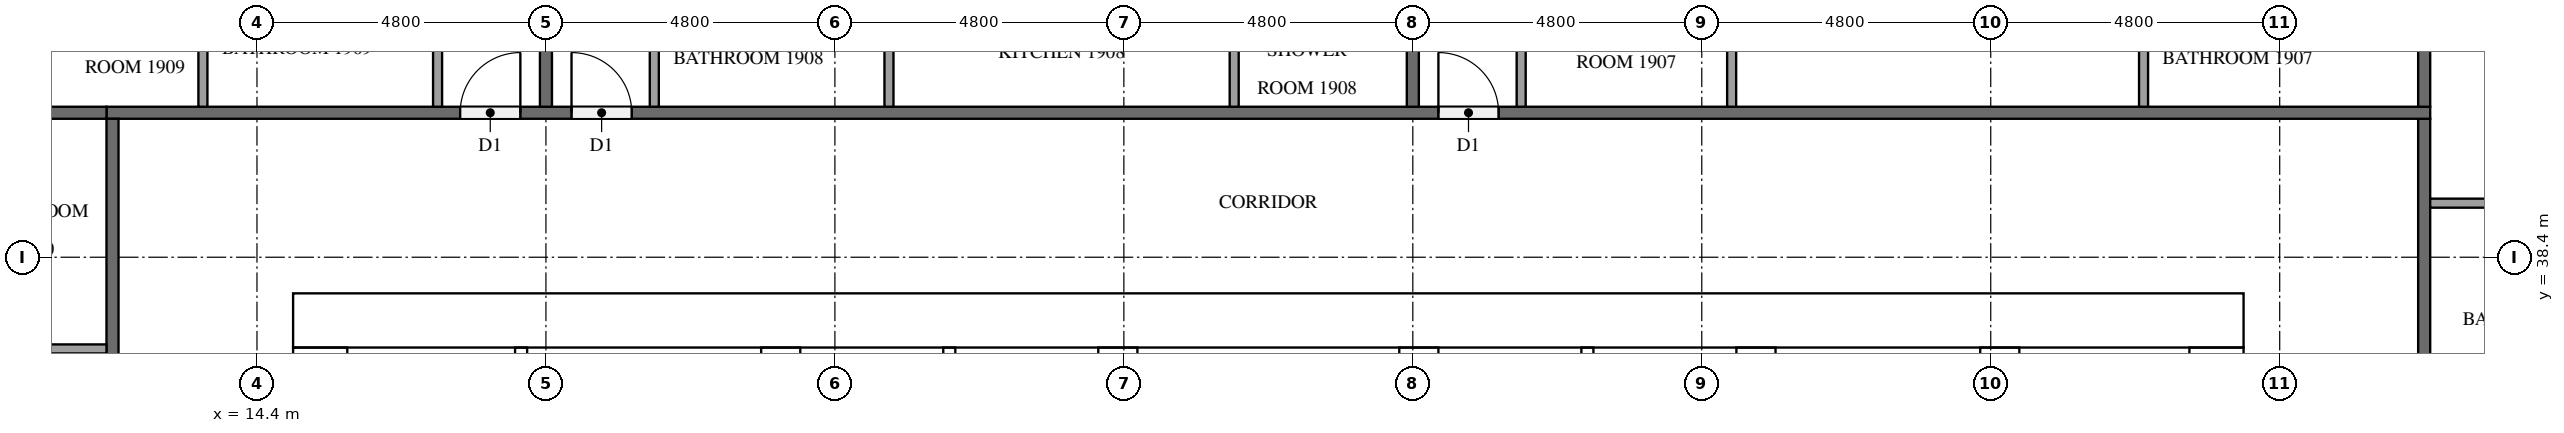
"""IFC4 building model, lengths in metres.
Left out: names, types, materials, properties, quantities, classifications, styles, units other than length and angle.
Written with IfcOpenShell. Run it as: python <this file> out.ifc"""

import sys

from ifc_helpers import new_model, si_unit, direction, frame, frame_2d, origin, place, context, subcontext, project, spatial, rectangle, extrude, element, fill, save


model = new_model("IFC4")
c1 = context("Model", 3, precision=1e-05, world=origin(), true_north=direction((0.0, 1.0)))
c2 = subcontext(c1, "Body", "Model", "MODEL_VIEW")
j1 = project(units=[si_unit("LENGTHUNIT", "METRE"), si_unit("PLANEANGLEUNIT", "RADIAN")], contexts=[c1])
p1 = place(None, origin())
s1 = spatial("IfcSite", under=j1, at=p1, CompositionType="ELEMENT")
p2 = place(p1, origin())
s2 = spatial("IfcBuilding", under=s1, at=p2, CompositionType="ELEMENT")
p3 = place(p2, frame((0.0, 0.0, 76.8)))
s3 = spatial("IfcBuildingStorey", under=s2, at=p3, CompositionType="ELEMENT", Elevation=76.8)
p4 = place(p3, frame((15.0, 37.35, 0.0), z_axis=(0.0, 0.0, 1.0), x_axis=(1.0, 0.0, 0.0)))
e1 = element("IfcWall", 1, at=p4, inside=s3, PredefinedType="SHEAR", context=c2, shape_type="SweptSolid", body=[
    extrude(rectangle(XDim=32.4, YDim=0.9, at=frame_2d((16.2, 0.0))), origin(), (0.0, 0.0, 1.0), 3.2),
])
p5 = place(p4, frame((15.3, 0.0, 0.0)))
e2 = element("IfcOpeningElement", 2, at=p5, cuts=e1, PredefinedType="OPENING", context=c2, shape_type="SweptSolid", body=[
    extrude(rectangle(XDim=1.8, YDim=2.1, at=frame_2d((0.9, 1.05))), frame((0.0, 0.46, 0.0), z_axis=(0.0, -1.0, 0.0), x_axis=(1.0, 0.0, 0.0)), (0.0, 0.0, 1.0), 0.92),
])
p6 = place(p4, frame((1.794, 0.0, 0.0)))
e3 = element("IfcOpeningElement", 3, at=p6, cuts=e1, PredefinedType="OPENING", context=c2, shape_type="SweptSolid", body=[
    extrude(rectangle(XDim=1.0, YDim=2.1, at=frame_2d((0.5, 1.05))), frame((0.0, 0.46, 0.0), z_axis=(0.0, -1.0, 0.0), x_axis=(1.0, 0.0, 0.0)), (0.0, 0.0, 1.0), 0.92),
])
p7 = place(p4, frame((5.331, 0.0, 0.0)))
e4 = element("IfcOpeningElement", 4, at=p7, cuts=e1, PredefinedType="OPENING", context=c2, shape_type="SweptSolid", body=[
    extrude(rectangle(XDim=1.0, YDim=2.1, at=frame_2d((0.5, 1.05))), frame((0.0, 0.46, 0.0), z_axis=(0.0, -1.0, 0.0), x_axis=(1.0, 0.0, 0.0)), (0.0, 0.0, 1.0), 0.92),
])
p8 = place(p3, frame((15.45, 15.9, 0.0), z_axis=(0.0, 0.0, 1.0), x_axis=(0.0, 1.0, 0.0)))
e5 = element("IfcWall", 5, at=p8, inside=s3, PredefinedType="SHEAR", context=c2, shape_type="SweptSolid", body=[
    extrude(rectangle(XDim=21.0, YDim=0.9, at=frame_2d((10.5, 0.0))), origin(), (0.0, 0.0, 1.0), 3.2),
])
p9 = place(p8, frame((4.86, 0.0, 0.0)))
e6 = element("IfcOpeningElement", 6, at=p9, cuts=e5, PredefinedType="OPENING", context=c2, shape_type="SweptSolid", body=[
    extrude(rectangle(XDim=1.2, YDim=2.1, at=frame_2d((0.6, 1.05))), frame((0.0, 0.46, 0.0), z_axis=(0.0, -1.0, 0.0), x_axis=(1.0, 0.0, 0.0)), (0.0, 0.0, 1.0), 0.92),
])
p10 = place(p3, frame((46.95, 15.9, 0.0), z_axis=(0.0, 0.0, 1.0), x_axis=(0.0, 1.0, 0.0)))
e7 = element("IfcWall", 7, at=p10, inside=s3, PredefinedType="SHEAR", context=c2, shape_type="SweptSolid", body=[
    extrude(rectangle(XDim=21.0, YDim=0.9, at=frame_2d((10.5, 0.0))), origin(), (0.0, 0.0, 1.0), 3.2),
])
p11 = place(p10, frame((10.2, 0.0, 0.0)))
e8 = element("IfcOpeningElement", 8, at=p11, cuts=e7, PredefinedType="OPENING", context=c2, shape_type="SweptSolid", body=[
    extrude(rectangle(XDim=1.2, YDim=2.1, at=frame_2d((0.6, 1.05))), frame((0.0, 0.46, 0.0), z_axis=(0.0, -1.0, 0.0), x_axis=(1.0, 0.0, 0.0)), (0.0, 0.0, 1.0), 0.92),
])
p12 = place(p3, frame((23.1, 15.9, 0.0), z_axis=(0.0, 0.0, 1.0), x_axis=(0.0, 1.0, 0.0)))
e9 = element("IfcWall", 9, at=p12, inside=s3, PredefinedType="SHEAR", context=c2, shape_type="SweptSolid", body=[
    extrude(rectangle(XDim=21.0, YDim=0.65, at=frame_2d((10.5, 0.0))), origin(), (0.0, 0.0, 1.0), 3.2),
])
p13 = place(p3, frame((39.3, 27.75, 0.0), z_axis=(0.0, 0.0, 1.0), x_axis=(0.0, 1.0, 0.0)))
e10 = element("IfcWall", 10, at=p13, inside=s3, PredefinedType="SHEAR", context=c2, shape_type="SweptSolid", body=[
    extrude(rectangle(XDim=9.15, YDim=0.65, at=frame_2d((4.575, 0.0))), origin(), (0.0, 0.0, 1.0), 3.2),
])
p14 = place(p3, frame((43.35, 27.75, 0.0), z_axis=(0.0, 0.0, 1.0), x_axis=(0.0, 1.0, 0.0)))
e11 = element("IfcWall", 11, at=p14, inside=s3, PredefinedType="SHEAR", context=c2, shape_type="SweptSolid", body=[
    extrude(rectangle(XDim=9.15, YDim=0.65, at=frame_2d((4.575, 0.0))), origin(), (0.0, 0.0, 1.0), 3.2),
])
p15 = place(p14, frame((7.65, 0.0, 0.0)))
e12 = element("IfcOpeningElement", 12, at=p15, cuts=e11, PredefinedType="OPENING", context=c2, shape_type="SweptSolid", body=[
    extrude(rectangle(XDim=1.2, YDim=2.1, at=frame_2d((0.6, 1.05))), frame((0.0, 0.335, 0.0), z_axis=(0.0, -1.0, 0.0), x_axis=(1.0, 0.0, 0.0)), (0.0, 0.0, 1.0), 0.67),
])
for number, where, z_axis, x_axis in (
    (13, (28.7, 33.875, 0.0), (0.0, 0.0, 1.0), (0.0, 1.0, 0.0)),
    (14, (33.7, 33.875, 0.0), (0.0, 0.0, 1.0), (0.0, 1.0, 0.0)),
):
    element("IfcWall", number, at=place(p3, frame(where, z_axis=z_axis, x_axis=x_axis)), inside=s3, PredefinedType="SHEAR", context=c2, shape_type="SweptSolid", body=[
        extrude(rectangle(XDim=3.025, YDim=0.65, at=frame_2d((1.512, 0.0))), origin(), (0.0, 0.0, 1.0), 3.2),
    ])
for number, where, z_axis, x_axis in (
    (15, (25.9, 33.875, 0.0), (0.0, 0.0, 1.0), (0.0, 1.0, 0.0)),
    (16, (36.5, 33.875, 0.0), (0.0, 0.0, 1.0), (0.0, 1.0, 0.0)),
):
    element("IfcWall", number, at=place(p3, frame(where, z_axis=z_axis, x_axis=x_axis)), inside=s3, PredefinedType="SOLIDWALL", context=c2, shape_type="SweptSolid", body=[
        extrude(rectangle(XDim=3.025, YDim=0.2, at=frame_2d((1.512, 0.0))), origin(), (0.0, 0.0, 1.0), 3.2),
    ])
p16 = place(p3, frame((18.788, 31.575, 0.0), z_axis=(0.0, 0.0, 1.0), x_axis=(0.0, 1.0, 0.0)))
e17 = element("IfcWall", 17, at=p16, inside=s3, PredefinedType="PARTITIONING", context=c2, shape_type="SweptSolid", body=[
    extrude(rectangle(XDim=5.325, YDim=0.2, at=frame_2d((2.663, 0.0))), origin(), (0.0, 0.0, 1.0), 3.2),
])
p17 = place(p3, frame((50.4, 40.7, 0.0), z_axis=(0.0, 0.0, 1.0), x_axis=(0.0, -1.0, 0.0)))
e18 = element("IfcWall", 18, at=p17, inside=s3, PredefinedType="PARTITIONING", context=c2, shape_type="SweptSolid", body=[
    extrude(rectangle(XDim=28.6, YDim=0.2, at=frame_2d((14.3, 0.0))), origin(), (0.0, 0.0, 1.0), 3.2),
])
p18 = place(p17, frame((21.875, 0.0, 0.0)))
e19 = element("IfcOpeningElement", 19, at=p18, cuts=e18, PredefinedType="OPENING", context=c2, shape_type="SweptSolid", body=[
    extrude(rectangle(XDim=1.1, YDim=2.1, at=frame_2d((0.55, 1.05))), frame((0.0, 0.11, 0.0), z_axis=(0.0, -1.0, 0.0), x_axis=(1.0, 0.0, 0.0)), (0.0, 0.0, 1.0), 0.22),
])
p19 = place(p17, frame((20.075, 0.0, 0.0)))
e20 = element("IfcOpeningElement", 20, at=p19, cuts=e18, PredefinedType="OPENING", context=c2, shape_type="SweptSolid", body=[
    extrude(rectangle(XDim=1.0, YDim=2.1, at=frame_2d((0.5, 1.05))), frame((0.0, 0.11, 0.0), z_axis=(0.0, -1.0, 0.0), x_axis=(1.0, 0.0, 0.0)), (0.0, 0.0, 1.0), 0.22),
])
p20 = place(p17, frame((5.675, 0.0, 0.0)))
e21 = element("IfcOpeningElement", 21, at=p20, cuts=e18, PredefinedType="OPENING", context=c2, shape_type="SweptSolid", body=[
    extrude(rectangle(XDim=1.0, YDim=2.1, at=frame_2d((0.5, 1.05))), frame((0.0, 0.11, 0.0), z_axis=(0.0, -1.0, 0.0), x_axis=(1.0, 0.0, 0.0)), (0.0, 0.0, 1.0), 0.22),
])
p21 = place(p3, frame((11.9, 40.8, 0.0), z_axis=(0.0, 0.0, 1.0), x_axis=(1.0, 0.0, 0.0)))
e22 = element("IfcWall", 22, at=p21, inside=s3, PredefinedType="PARTITIONING", context=c2, shape_type="SweptSolid", body=[
    extrude(rectangle(XDim=38.6, YDim=0.2, at=frame_2d((19.3, 0.0))), origin(), (0.0, 0.0, 1.0), 3.2),
])
p22 = place(p21, frame((22.125, 0.0, 0.0)))
e23 = element("IfcOpeningElement", 23, at=p22, cuts=e22, PredefinedType="OPENING", context=c2, shape_type="SweptSolid", body=[
    extrude(rectangle(XDim=1.0, YDim=2.1, at=frame_2d((0.5, 1.05))), frame((0.0, 0.11, 0.0), z_axis=(0.0, -1.0, 0.0), x_axis=(1.0, 0.0, 0.0)), (0.0, 0.0, 1.0), 0.22),
])
p23 = place(p21, frame((7.725, 0.0, 0.0)))
e24 = element("IfcOpeningElement", 24, at=p23, cuts=e22, PredefinedType="OPENING", context=c2, shape_type="SweptSolid", body=[
    extrude(rectangle(XDim=1.0, YDim=2.1, at=frame_2d((0.5, 1.05))), frame((0.0, 0.11, 0.0), z_axis=(0.0, -1.0, 0.0), x_axis=(1.0, 0.0, 0.0)), (0.0, 0.0, 1.0), 0.22),
])
p24 = place(p21, frame((5.875, 0.0, 0.0)))
e25 = element("IfcOpeningElement", 25, at=p24, cuts=e22, PredefinedType="OPENING", context=c2, shape_type="SweptSolid", body=[
    extrude(rectangle(XDim=1.0, YDim=2.1, at=frame_2d((0.5, 1.05))), frame((0.0, 0.11, 0.0), z_axis=(0.0, -1.0, 0.0), x_axis=(1.0, 0.0, 0.0)), (0.0, 0.0, 1.0), 0.22),
])
p25 = place(p3, frame((12.0, 12.1, 0.0), z_axis=(0.0, 0.0, 1.0), x_axis=(0.0, 1.0, 0.0)))
e26 = element("IfcWall", 26, at=p25, inside=s3, PredefinedType="PARTITIONING", context=c2, shape_type="SweptSolid", body=[
    extrude(rectangle(XDim=28.6, YDim=0.2, at=frame_2d((14.3, 0.0))), origin(), (0.0, 0.0, 1.0), 3.2),
])
p26 = place(p25, frame((14.725, 0.0, 0.0)))
e27 = element("IfcOpeningElement", 27, at=p26, cuts=e26, PredefinedType="OPENING", context=c2, shape_type="SweptSolid", body=[
    extrude(rectangle(XDim=1.0, YDim=2.1, at=frame_2d((0.5, 1.05))), frame((0.0, 0.11, 0.0), z_axis=(0.0, -1.0, 0.0), x_axis=(1.0, 0.0, 0.0)), (0.0, 0.0, 1.0), 0.22),
])
p27 = place(p25, frame((12.875, 0.0, 0.0)))
e28 = element("IfcOpeningElement", 28, at=p27, cuts=e26, PredefinedType="OPENING", context=c2, shape_type="SweptSolid", body=[
    extrude(rectangle(XDim=1.0, YDim=2.1, at=frame_2d((0.5, 1.05))), frame((0.0, 0.11, 0.0), z_axis=(0.0, -1.0, 0.0), x_axis=(1.0, 0.0, 0.0)), (0.0, 0.0, 1.0), 0.22),
])
p28 = place(p25, frame((0.875, 0.0, 0.0)))
e29 = element("IfcOpeningElement", 29, at=p28, cuts=e26, PredefinedType="OPENING", context=c2, shape_type="SweptSolid", body=[
    extrude(rectangle(XDim=1.0, YDim=2.1, at=frame_2d((0.5, 1.05))), frame((0.0, 0.11, 0.0), z_axis=(0.0, -1.0, 0.0), x_axis=(1.0, 0.0, 0.0)), (0.0, 0.0, 1.0), 0.22),
])
for number, where, z_axis, x_axis in (
    (30, (50.4, 40.9, 0.0), (0.0, 0.0, 1.0), (0.0, 1.0, 0.0)),
    (31, (33.6, 47.9, 0.0), (0.0, 0.0, 1.0), (0.0, -1.0, 0.0)),
):
    element("IfcWall", number, at=place(p3, frame(where, z_axis=z_axis, x_axis=x_axis)), inside=s3, PredefinedType="PARTITIONING", context=c2, shape_type="SweptSolid", body=[
        extrude(rectangle(XDim=7.0, YDim=0.2, at=frame_2d((3.5, 0.0))), origin(), (0.0, 0.0, 1.0), 3.2),
    ])
p29 = place(p3, frame((19.2, 47.575, 0.0), z_axis=(0.0, 0.0, 1.0), x_axis=(0.0, -1.0, 0.0)))
e32 = element("IfcWall", 32, at=p29, inside=s3, PredefinedType="PARTITIONING", context=c2, shape_type="SweptSolid", body=[
    extrude(rectangle(XDim=6.675, YDim=0.2, at=frame_2d((3.337, 0.0))), origin(), (0.0, 0.0, 1.0), 3.2),
])
p30 = place(p3, frame((4.9, 40.8, 0.0), z_axis=(0.0, 0.0, 1.0), x_axis=(1.0, 0.0, 0.0)))
e33 = element("IfcWall", 33, at=p30, inside=s3, PredefinedType="PARTITIONING", context=c2, shape_type="SweptSolid", body=[
    extrude(rectangle(XDim=7.0, YDim=0.2, at=frame_2d((3.5, 0.0))), origin(), (0.0, 0.0, 1.0), 3.2),
])
p31 = place(p3, frame((50.5, 39.298, 0.0), z_axis=(0.0, 0.0, 1.0), x_axis=(1.0, 0.0, 0.0)))
e34 = element("IfcWall", 34, at=p31, inside=s3, PredefinedType="PARTITIONING", context=c2, shape_type="SweptSolid", body=[
    extrude(rectangle(XDim=3.575, YDim=0.15, at=frame_2d((1.788, 0.0))), origin(), (0.0, 0.0, 1.0), 3.2),
])
for number, where, z_axis, x_axis in (
    (35, (38.896, 40.9, 0.0), (0.0, 0.0, 1.0), (0.0, 1.0, 0.0)),
    (36, (45.739, 40.9, 0.0), (0.0, 0.0, 1.0), (0.0, 1.0, 0.0)),
):
    element("IfcWall", number, at=place(p3, frame(where, z_axis=z_axis, x_axis=x_axis)), inside=s3, PredefinedType="PARTITIONING", context=c2, shape_type="SweptSolid", body=[
        extrude(rectangle(XDim=2.075, YDim=0.15, at=frame_2d((1.038, 0.0))), origin(), (0.0, 0.0, 1.0), 3.2),
    ])
p32 = place(p3, frame((35.4, 40.9, 0.0), z_axis=(0.0, 0.0, 1.0), x_axis=(0.0, 1.0, 0.0)))
e37 = element("IfcWall", 37, at=p32, inside=s3, PredefinedType="PARTITIONING", context=c2, shape_type="SweptSolid", body=[
    extrude(rectangle(XDim=2.225, YDim=0.15, at=frame_2d((1.113, 0.0))), origin(), (0.0, 0.0, 1.0), 3.2),
])
for number, where, z_axis, x_axis in (
    (38, (24.898, 40.9, 0.0), (0.0, 0.0, 1.0), (0.0, 1.0, 0.0)),
    (39, (30.633, 40.9, 0.0), (0.0, 0.0, 1.0), (0.0, 1.0, 0.0)),
):
    element("IfcWall", number, at=place(p3, frame(where, z_axis=z_axis, x_axis=x_axis)), inside=s3, PredefinedType="PARTITIONING", context=c2, shape_type="SweptSolid", body=[
        extrude(rectangle(XDim=1.775, YDim=0.15, at=frame_2d((0.888, 0.0))), origin(), (0.0, 0.0, 1.0), 3.2),
    ])
p33 = place(p3, frame((21.0, 40.9, 0.0), z_axis=(0.0, 0.0, 1.0), x_axis=(0.0, 1.0, 0.0)))
e40 = element("IfcWall", 40, at=p33, inside=s3, PredefinedType="PARTITIONING", context=c2, shape_type="SweptSolid", body=[
    extrude(rectangle(XDim=1.925, YDim=0.15, at=frame_2d((0.962, 0.0))), origin(), (0.0, 0.0, 1.0), 3.2),
])
p34 = place(p3, frame((13.502, 40.9, 0.0), z_axis=(0.0, 0.0, 1.0), x_axis=(0.0, 1.0, 0.0)))
e41 = element("IfcWall", 41, at=p34, inside=s3, PredefinedType="PARTITIONING", context=c2, shape_type="SweptSolid", body=[
    extrude(rectangle(XDim=2.075, YDim=0.15, at=frame_2d((1.038, 0.0))), origin(), (0.0, 0.0, 1.0), 3.2),
])
p35 = place(p3, frame((17.4, 40.9, 0.0), z_axis=(0.0, 0.0, 1.0), x_axis=(0.0, 1.0, 0.0)))
e42 = element("IfcWall", 42, at=p35, inside=s3, PredefinedType="PARTITIONING", context=c2, shape_type="SweptSolid", body=[
    extrude(rectangle(XDim=2.225, YDim=0.15, at=frame_2d((1.113, 0.0))), origin(), (0.0, 0.0, 1.0), 3.2),
])
p36 = place(p3, frame((11.9, 36.877, 0.0), z_axis=(0.0, 0.0, 1.0), x_axis=(-1.0, 0.0, 0.0)))
e43 = element("IfcWall", 43, at=p36, inside=s3, PredefinedType="PARTITIONING", context=c2, shape_type="SweptSolid", body=[
    extrude(rectangle(XDim=2.375, YDim=0.15, at=frame_2d((1.188, 0.0))), origin(), (0.0, 0.0, 1.0), 3.2),
])
p37 = place(p5, origin())
e44 = element("IfcDoor", 44, at=p37, inside=s3, OperationType="DOUBLE_DOOR_SINGLE_SWING", PredefinedType="DOOR", context=c2, shape_type="SweptSolid", body=[
    extrude(rectangle(XDim=1.8, YDim=2.1, at=frame_2d((0.9, 1.05))), frame((0.0, 0.025, 0.0), z_axis=(0.0, -1.0, 0.0), x_axis=(1.0, 0.0, 0.0)), (0.0, 0.0, 1.0), 0.05),
])
fill(e2, e44)
p38 = place(p6, origin())
e45 = element("IfcDoor", 45, at=p38, inside=s3, OperationType="SINGLE_SWING_RIGHT", PredefinedType="DOOR", context=c2, shape_type="SweptSolid", body=[
    extrude(rectangle(XDim=1.0, YDim=2.1, at=frame_2d((0.5, 1.05))), frame((0.0, 0.025, 0.0), z_axis=(0.0, -1.0, 0.0), x_axis=(1.0, 0.0, 0.0)), (0.0, 0.0, 1.0), 0.05),
])
fill(e3, e45)
p39 = place(p7, origin())
e46 = element("IfcDoor", 46, at=p39, inside=s3, OperationType="SINGLE_SWING_LEFT", PredefinedType="DOOR", context=c2, shape_type="SweptSolid", body=[
    extrude(rectangle(XDim=1.0, YDim=2.1, at=frame_2d((0.5, 1.05))), frame((0.0, 0.025, 0.0), z_axis=(0.0, -1.0, 0.0), x_axis=(1.0, 0.0, 0.0)), (0.0, 0.0, 1.0), 0.05),
])
fill(e4, e46)
p40 = place(p22, origin())
e47 = element("IfcDoor", 47, at=p40, inside=s3, OperationType="SINGLE_SWING_LEFT", PredefinedType="DOOR", context=c2, shape_type="SweptSolid", body=[
    extrude(rectangle(XDim=1.0, YDim=2.1, at=frame_2d((0.5, 1.05))), frame((0.0, 0.025, 0.0), z_axis=(0.0, -1.0, 0.0), x_axis=(1.0, 0.0, 0.0)), (0.0, 0.0, 1.0), 0.05),
])
fill(e23, e47)
p41 = place(p23, origin())
e48 = element("IfcDoor", 48, at=p41, inside=s3, OperationType="SINGLE_SWING_LEFT", PredefinedType="DOOR", context=c2, shape_type="SweptSolid", body=[
    extrude(rectangle(XDim=1.0, YDim=2.1, at=frame_2d((0.5, 1.05))), frame((0.0, 0.025, 0.0), z_axis=(0.0, -1.0, 0.0), x_axis=(1.0, 0.0, 0.0)), (0.0, 0.0, 1.0), 0.05),
])
fill(e24, e48)
p42 = place(p24, origin())
e49 = element("IfcDoor", 49, at=p42, inside=s3, OperationType="SINGLE_SWING_RIGHT", PredefinedType="DOOR", context=c2, shape_type="SweptSolid", body=[
    extrude(rectangle(XDim=1.0, YDim=2.1, at=frame_2d((0.5, 1.05))), frame((0.0, 0.025, 0.0), z_axis=(0.0, -1.0, 0.0), x_axis=(1.0, 0.0, 0.0)), (0.0, 0.0, 1.0), 0.05),
])
fill(e25, e49)
save(model, sys.argv[1])
